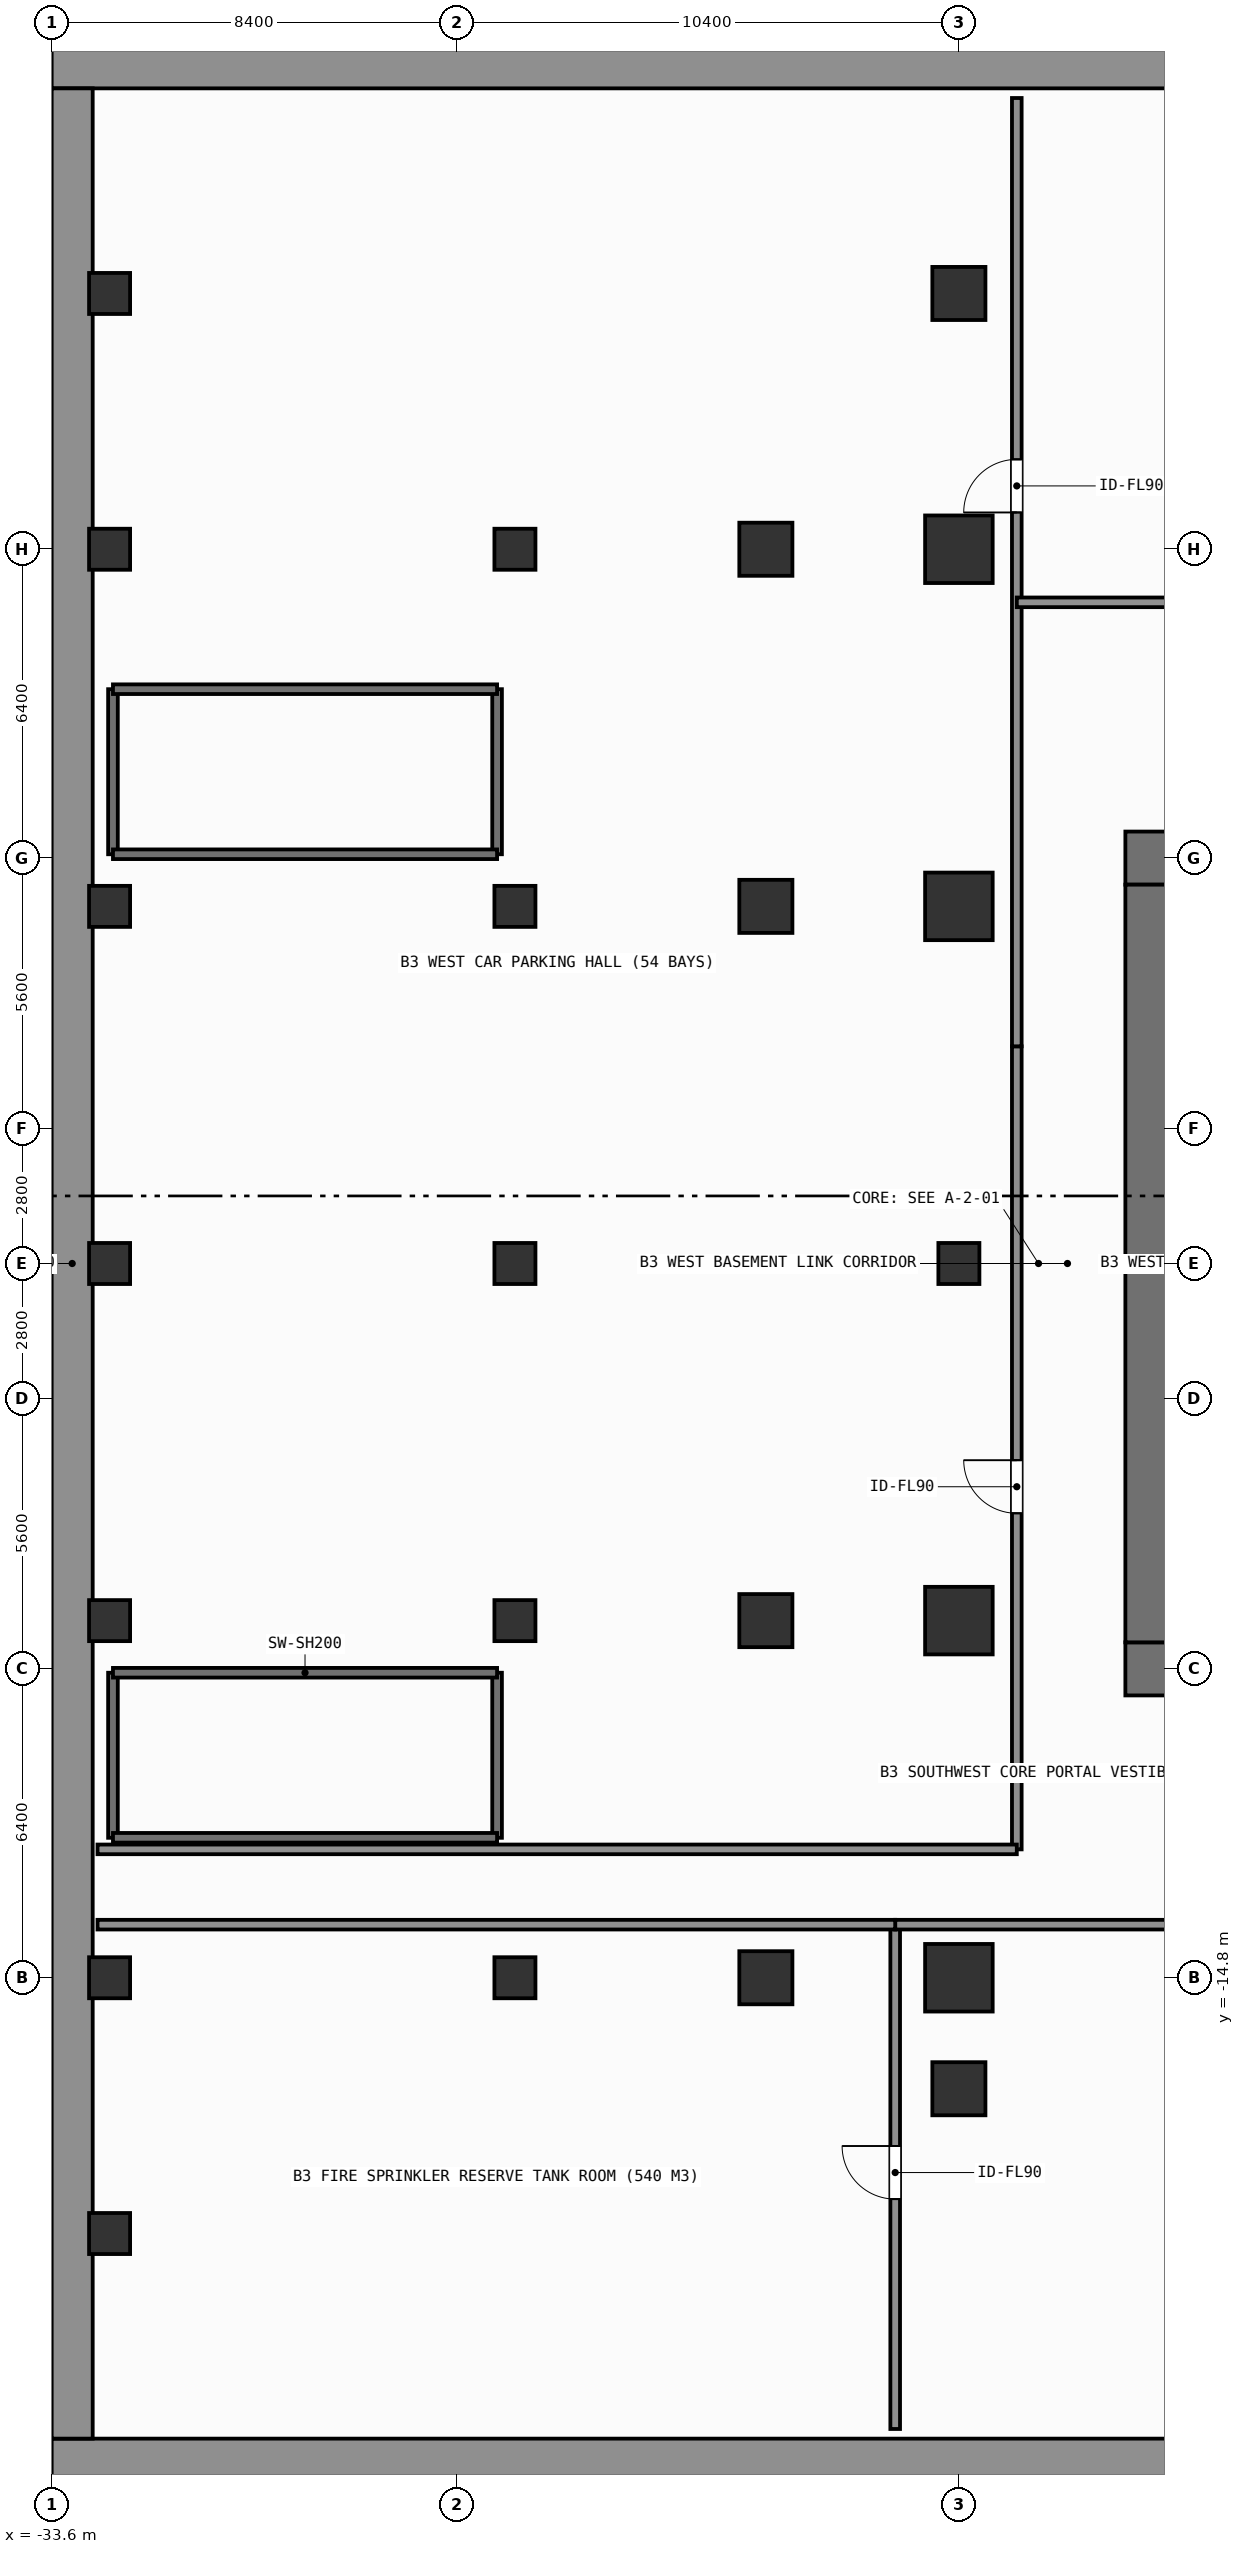
"""IFC4 building model, lengths in metres.
Left out: names, types, materials, properties, quantities, classifications, styles, units other than length and angle.
Written with IfcOpenShell. Run it as: python <this file> out.ifc"""

import sys

from ifc_helpers import new_model, si_unit, direction, frame, frame_2d, origin, origin_2d, place, context, subcontext, project, spatial, rectangle, extrude, element, fill, save


model = new_model("IFC4")
c1 = context("Model", 3, precision=1e-05, world=origin(), true_north=direction((0.0, 1.0)))
c2 = subcontext(c1, "Body", "Model", "MODEL_VIEW")
j1 = project(units=[si_unit("LENGTHUNIT", "METRE"), si_unit("PLANEANGLEUNIT", "RADIAN")], contexts=[c1])
p1 = place(None, origin())
s1 = spatial("IfcSite", under=j1, at=p1, CompositionType="ELEMENT")
p2 = place(p1, origin())
s2 = spatial("IfcBuilding", under=s1, at=p2, CompositionType="ELEMENT")
p3 = place(p2, frame((0.0, 0.0, -12.6)))
s3 = spatial("IfcBuildingStorey", under=s2, at=p3, CompositionType="ELEMENT", Elevation=-12.6)
for number, where, z_axis, x_axis in (
    (1, (-33.6, -24.775, 0.0), (0.0, 0.0, 1.0), (1.0, 0.0, 0.0)),
    (2, (-33.6, 24.775, 0.0), (0.0, 0.0, 1.0), (1.0, 0.0, 0.0)),
):
    element("IfcWall", number, at=place(p3, frame(where, z_axis=z_axis, x_axis=x_axis)), inside=s3, PredefinedType="SOLIDWALL", context=c2, shape_type="SweptSolid", body=[
        extrude(rectangle(XDim=67.2, YDim=0.85, at=frame_2d((33.6, 0.0))), origin(), (0.0, 0.0, 1.0), 4.2),
    ])
p4 = place(p3, frame((-33.175, -24.35, 0.0), z_axis=(0.0, 0.0, 1.0), x_axis=(0.0, 1.0, 0.0)))
e3 = element("IfcWall", 3, at=p4, inside=s3, PredefinedType="SOLIDWALL", context=c2, shape_type="SweptSolid", body=[
    extrude(rectangle(XDim=48.7, YDim=0.85, at=frame_2d((24.35, 0.0))), origin(), (0.0, 0.0, 1.0), 4.2),
])
for number, where, z_axis, x_axis in (
    (4, (-11.35, -8.4, 0.0), (0.0, 0.0, 1.0), (1.0, 0.0, 0.0)),
    (5, (-11.35, 8.4, 0.0), (0.0, 0.0, 1.0), (1.0, 0.0, 0.0)),
):
    element("IfcWall", number, at=place(p3, frame(where, z_axis=z_axis, x_axis=x_axis)), inside=s3, PredefinedType="SHEAR", context=c2, shape_type="SweptSolid", body=[
        extrude(rectangle(XDim=1.65, YDim=1.1, at=frame_2d((0.825, 0.0))), origin(), (0.0, 0.0, 1.0), 4.2),
    ])
p5 = place(p3, frame((-10.8, -7.85, 0.0), z_axis=(0.0, 0.0, 1.0), x_axis=(0.0, 1.0, 0.0)))
e6 = element("IfcWall", 6, at=p5, inside=s3, PredefinedType="SHEAR", context=c2, shape_type="SweptSolid", body=[
    extrude(rectangle(XDim=15.7, YDim=1.1, at=frame_2d((7.85, 0.0))), origin(), (0.0, 0.0, 1.0), 4.2),
])
for number, where, z_axis, x_axis in (
    (7, (-14.8, -14.8, 0.0), (0.0, 0.0, 1.0), (1.0, 0.0, 0.0)),
    (8, (-14.8, 14.8, 0.0), (0.0, 0.0, 1.0), (1.0, 0.0, 0.0)),
    (9, (-14.8, -7.4, 0.0), (0.0, 0.0, 1.0), (1.0, 0.0, 0.0)),
    (10, (-14.8, 7.4, 0.0), (0.0, 0.0, 1.0), (1.0, 0.0, 0.0)),
):
    element("IfcColumn", number, at=place(p3, frame(where, z_axis=z_axis, x_axis=x_axis)), inside=s3, PredefinedType="COLUMN", context=c2, shape_type="SweptSolid", body=[
        extrude(rectangle(XDim=1.4, YDim=1.4, at=origin_2d()), origin(), (0.0, 0.0, 1.0), 4.2),
    ])
for number, where, z_axis, x_axis in (
    (11, (-18.8, -14.8, 0.0), (0.0, 0.0, 1.0), (1.0, 0.0, 0.0)),
    (12, (-18.8, -7.4, 0.0), (0.0, 0.0, 1.0), (1.0, 0.0, 0.0)),
    (13, (-18.8, 7.4, 0.0), (0.0, 0.0, 1.0), (1.0, 0.0, 0.0)),
    (14, (-18.8, 14.8, 0.0), (0.0, 0.0, 1.0), (1.0, 0.0, 0.0)),
    (15, (-14.8, -17.1, 0.0), (0.0, 0.0, 1.0), (1.0, 0.0, 0.0)),
    (16, (-14.8, 20.1, 0.0), (0.0, 0.0, 1.0), (1.0, 0.0, 0.0)),
):
    element("IfcColumn", number, at=place(p3, frame(where, z_axis=z_axis, x_axis=x_axis)), inside=s3, PredefinedType="COLUMN", context=c2, shape_type="SweptSolid", body=[
        extrude(rectangle(XDim=1.1, YDim=1.1, at=origin_2d()), origin(), (0.0, 0.0, 1.0), 4.2),
    ])
for number, where, z_axis, x_axis in (
    (17, (-32.4, -14.8, 0.0), (0.0, 0.0, 1.0), (1.0, 0.0, 0.0)),
    (18, (-32.4, -7.4, 0.0), (0.0, 0.0, 1.0), (1.0, 0.0, 0.0)),
    (19, (-32.4, 0.0, 0.0), (0.0, 0.0, 1.0), (1.0, 0.0, 0.0)),
    (20, (-32.4, 7.4, 0.0), (0.0, 0.0, 1.0), (1.0, 0.0, 0.0)),
    (21, (-32.4, 14.8, 0.0), (0.0, 0.0, 1.0), (1.0, 0.0, 0.0)),
    (22, (-24.0, -14.8, 0.0), (0.0, 0.0, 1.0), (1.0, 0.0, 0.0)),
    (23, (-24.0, -7.4, 0.0), (0.0, 0.0, 1.0), (1.0, 0.0, 0.0)),
    (24, (-24.0, 0.0, 0.0), (0.0, 0.0, 1.0), (1.0, 0.0, 0.0)),
    (25, (-24.0, 7.4, 0.0), (0.0, 0.0, 1.0), (1.0, 0.0, 0.0)),
    (26, (-24.0, 14.8, 0.0), (0.0, 0.0, 1.0), (1.0, 0.0, 0.0)),
    (27, (-14.8, 0.0, 0.0), (0.0, 0.0, 1.0), (1.0, 0.0, 0.0)),
    (28, (-32.4, -20.1, 0.0), (0.0, 0.0, 1.0), (1.0, 0.0, 0.0)),
    (29, (-32.4, 20.1, 0.0), (0.0, 0.0, 1.0), (1.0, 0.0, 0.0)),
):
    element("IfcColumn", number, at=place(p3, frame(where, z_axis=z_axis, x_axis=x_axis)), inside=s3, PredefinedType="COLUMN", context=c2, shape_type="SweptSolid", body=[
        extrude(rectangle(XDim=0.85, YDim=0.85, at=origin_2d()), origin(), (0.0, 0.0, 1.0), 4.2),
    ])
for number, where, z_axis, x_axis in (
    (30, (-32.33, -11.9, 0.0), (0.0, 0.0, 1.0), (0.0, 1.0, 0.0)),
    (31, (-24.37, -8.48, 0.0), (0.0, 0.0, 1.0), (0.0, -1.0, 0.0)),
):
    element("IfcWall", number, at=place(p3, frame(where, z_axis=z_axis, x_axis=x_axis)), inside=s3, PredefinedType="SHEAR", context=c2, shape_type="SweptSolid", body=[
        extrude(rectangle(XDim=3.42, YDim=0.2, at=frame_2d((1.71, 0.0))), origin(), (0.0, 0.0, 1.0), 3.94),
    ])
for number, where, z_axis, x_axis in (
    (32, (-24.37, -11.9, 0.0), (0.0, 0.0, 1.0), (-1.0, 0.0, 0.0)),
    (33, (-32.33, -8.48, 0.0), (0.0, 0.0, 1.0), (1.0, 0.0, 0.0)),
):
    element("IfcWall", number, at=place(p3, frame(where, z_axis=z_axis, x_axis=x_axis)), inside=s3, PredefinedType="SHEAR", context=c2, shape_type="SweptSolid", body=[
        extrude(rectangle(XDim=7.96, YDim=0.2, at=frame_2d((3.98, 0.0))), origin(), (0.0, 0.0, 1.0), 3.94),
    ])
for number, where, z_axis, x_axis in (
    (34, (-32.33, 8.48, 0.0), (0.0, 0.0, 1.0), (0.0, 1.0, 0.0)),
    (35, (-24.37, 11.9, 0.0), (0.0, 0.0, 1.0), (0.0, -1.0, 0.0)),
):
    element("IfcWall", number, at=place(p3, frame(where, z_axis=z_axis, x_axis=x_axis)), inside=s3, PredefinedType="SHEAR", context=c2, shape_type="SweptSolid", body=[
        extrude(rectangle(XDim=3.42, YDim=0.2, at=frame_2d((1.71, 0.0))), origin(), (0.0, 0.0, 1.0), 3.94),
    ])
for number, where, z_axis, x_axis in (
    (36, (-24.37, 8.48, 0.0), (0.0, 0.0, 1.0), (-1.0, 0.0, 0.0)),
    (37, (-32.33, 11.9, 0.0), (0.0, 0.0, 1.0), (1.0, 0.0, 0.0)),
):
    element("IfcWall", number, at=place(p3, frame(where, z_axis=z_axis, x_axis=x_axis)), inside=s3, PredefinedType="SHEAR", context=c2, shape_type="SweptSolid", body=[
        extrude(rectangle(XDim=7.96, YDim=0.2, at=frame_2d((3.98, 0.0))), origin(), (0.0, 0.0, 1.0), 3.94),
    ])
p6 = place(p3, frame((-13.6, -12.14, 0.0), z_axis=(0.0, 0.0, 1.0), x_axis=(0.0, 1.0, 0.0)))
e38 = element("IfcWall", 38, at=p6, inside=s3, PredefinedType="SOLIDWALL", context=c2, shape_type="SweptSolid", body=[
    extrude(rectangle(XDim=16.64, YDim=0.2, at=frame_2d((8.32, 0.0))), origin(), (0.0, 0.0, 1.0), 3.94),
])
p7 = place(p6, frame((6.964, 0.0, 0.0)))
e39 = element("IfcOpeningElement", 39, at=p7, cuts=e38, PredefinedType="OPENING", context=c2, shape_type="SweptSolid", body=[
    extrude(rectangle(XDim=1.1, YDim=2.15, at=frame_2d((0.55, 1.075))), frame((0.0, 0.11, 0.0), z_axis=(0.0, -1.0, 0.0), x_axis=(1.0, 0.0, 0.0)), (0.0, 0.0, 1.0), 0.22),
])
p8 = place(p3, frame((-13.6, 4.5, 0.0), z_axis=(0.0, 0.0, 1.0), x_axis=(0.0, 1.0, 0.0)))
e40 = element("IfcWall", 40, at=p8, inside=s3, PredefinedType="SOLIDWALL", context=c2, shape_type="SweptSolid", body=[
    extrude(rectangle(XDim=19.65, YDim=0.2, at=frame_2d((9.825, 0.0))), origin(), (0.0, 0.0, 1.0), 3.94),
])
p9 = place(p8, frame((11.062, 0.0, 0.0)))
e41 = element("IfcOpeningElement", 41, at=p9, cuts=e40, PredefinedType="OPENING", context=c2, shape_type="SweptSolid", body=[
    extrude(rectangle(XDim=1.1, YDim=2.15, at=frame_2d((0.55, 1.075))), frame((0.0, 0.11, 0.0), z_axis=(0.0, -1.0, 0.0), x_axis=(1.0, 0.0, 0.0)), (0.0, 0.0, 1.0), 0.22),
])
p10 = place(p3, frame((-13.6, 13.7, 0.0), z_axis=(0.0, 0.0, 1.0), x_axis=(1.0, 0.0, 0.0)))
e42 = element("IfcWall", 42, at=p10, inside=s3, PredefinedType="SOLIDWALL", context=c2, shape_type="SweptSolid", body=[
    extrude(rectangle(XDim=31.3, YDim=0.2, at=frame_2d((15.65, 0.0))), origin(), (0.0, 0.0, 1.0), 3.94),
])
p11 = place(p10, frame((14.38, 0.0, 0.0)))
e43 = element("IfcOpeningElement", 43, at=p11, cuts=e42, PredefinedType="OPENING", context=c2, shape_type="SweptSolid", body=[
    extrude(rectangle(XDim=1.1, YDim=2.15, at=frame_2d((0.55, 1.075))), frame((0.0, 0.11, 0.0), z_axis=(0.0, -1.0, 0.0), x_axis=(1.0, 0.0, 0.0)), (0.0, 0.0, 1.0), 0.22),
])
p12 = place(p3, frame((-16.12, -24.15, 0.0), z_axis=(0.0, 0.0, 1.0), x_axis=(0.0, 1.0, 0.0)))
e44 = element("IfcWall", 44, at=p12, inside=s3, PredefinedType="SOLIDWALL", context=c2, shape_type="SweptSolid", body=[
    extrude(rectangle(XDim=10.45, YDim=0.2, at=frame_2d((5.225, 0.0))), origin(), (0.0, 0.0, 1.0), 3.94),
])
p13 = place(p12, frame((4.763, 0.0, 0.0)))
e45 = element("IfcOpeningElement", 45, at=p13, cuts=e44, PredefinedType="OPENING", context=c2, shape_type="SweptSolid", body=[
    extrude(rectangle(XDim=1.1, YDim=2.15, at=frame_2d((0.55, 1.075))), frame((0.0, 0.11, 0.0), z_axis=(0.0, -1.0, 0.0), x_axis=(1.0, 0.0, 0.0)), (0.0, 0.0, 1.0), 0.22),
])
p14 = place(p3, frame((-16.12, -13.7, 0.0), z_axis=(0.0, 0.0, 1.0), x_axis=(1.0, 0.0, 0.0)))
e46 = element("IfcWall", 46, at=p14, inside=s3, PredefinedType="SOLIDWALL", context=c2, shape_type="SweptSolid", body=[
    extrude(rectangle(XDim=22.77, YDim=0.2, at=frame_2d((11.385, 0.0))), origin(), (0.0, 0.0, 1.0), 3.94),
])
p15 = place(p14, frame((10.745, 0.0, 0.0)))
e47 = element("IfcOpeningElement", 47, at=p15, cuts=e46, PredefinedType="OPENING", context=c2, shape_type="SweptSolid", body=[
    extrude(rectangle(XDim=1.1, YDim=2.15, at=frame_2d((0.55, 1.075))), frame((0.0, 0.11, 0.0), z_axis=(0.0, -1.0, 0.0), x_axis=(1.0, 0.0, 0.0)), (0.0, 0.0, 1.0), 0.22),
])
p16 = place(p3, frame((-32.65, -12.14, 0.0), z_axis=(0.0, 0.0, 1.0), x_axis=(1.0, 0.0, 0.0)))
e48 = element("IfcWall", 48, at=p16, inside=s3, PredefinedType="SOLIDWALL", context=c2, shape_type="SweptSolid", body=[
    extrude(rectangle(XDim=19.05, YDim=0.2, at=frame_2d((9.525, 0.0))), origin(), (0.0, 0.0, 1.0), 3.94),
])
p17 = place(p3, frame((-32.65, -13.7, 0.0), z_axis=(0.0, 0.0, 1.0), x_axis=(1.0, 0.0, 0.0)))
e49 = element("IfcWall", 49, at=p17, inside=s3, PredefinedType="SOLIDWALL", context=c2, shape_type="SweptSolid", body=[
    extrude(rectangle(XDim=16.53, YDim=0.2, at=frame_2d((8.265, 0.0))), origin(), (0.0, 0.0, 1.0), 3.94),
])
p18 = place(p7, origin())
e50 = element("IfcDoor", 50, at=p18, inside=s3, OperationType="SINGLE_SWING_RIGHT", PredefinedType="DOOR", context=c2, shape_type="SweptSolid", body=[
    extrude(rectangle(XDim=1.1, YDim=2.15, at=frame_2d((0.55, 1.075))), frame((0.0, 0.025, 0.0), z_axis=(0.0, -1.0, 0.0), x_axis=(1.0, 0.0, 0.0)), (0.0, 0.0, 1.0), 0.05),
])
fill(e39, e50)
p19 = place(p9, origin())
e51 = element("IfcDoor", 51, at=p19, inside=s3, OperationType="SINGLE_SWING_LEFT", PredefinedType="DOOR", context=c2, shape_type="SweptSolid", body=[
    extrude(rectangle(XDim=1.1, YDim=2.15, at=frame_2d((0.55, 1.075))), frame((0.0, 0.025, 0.0), z_axis=(0.0, -1.0, 0.0), x_axis=(1.0, 0.0, 0.0)), (0.0, 0.0, 1.0), 0.05),
])
fill(e41, e51)
p20 = place(p13, origin())
e52 = element("IfcDoor", 52, at=p20, inside=s3, OperationType="SINGLE_SWING_RIGHT", PredefinedType="DOOR", context=c2, shape_type="SweptSolid", body=[
    extrude(rectangle(XDim=1.1, YDim=2.15, at=frame_2d((0.55, 1.075))), frame((0.0, 0.025, 0.0), z_axis=(0.0, -1.0, 0.0), x_axis=(1.0, 0.0, 0.0)), (0.0, 0.0, 1.0), 0.05),
])
fill(e45, e52)
save(model, sys.argv[1])
